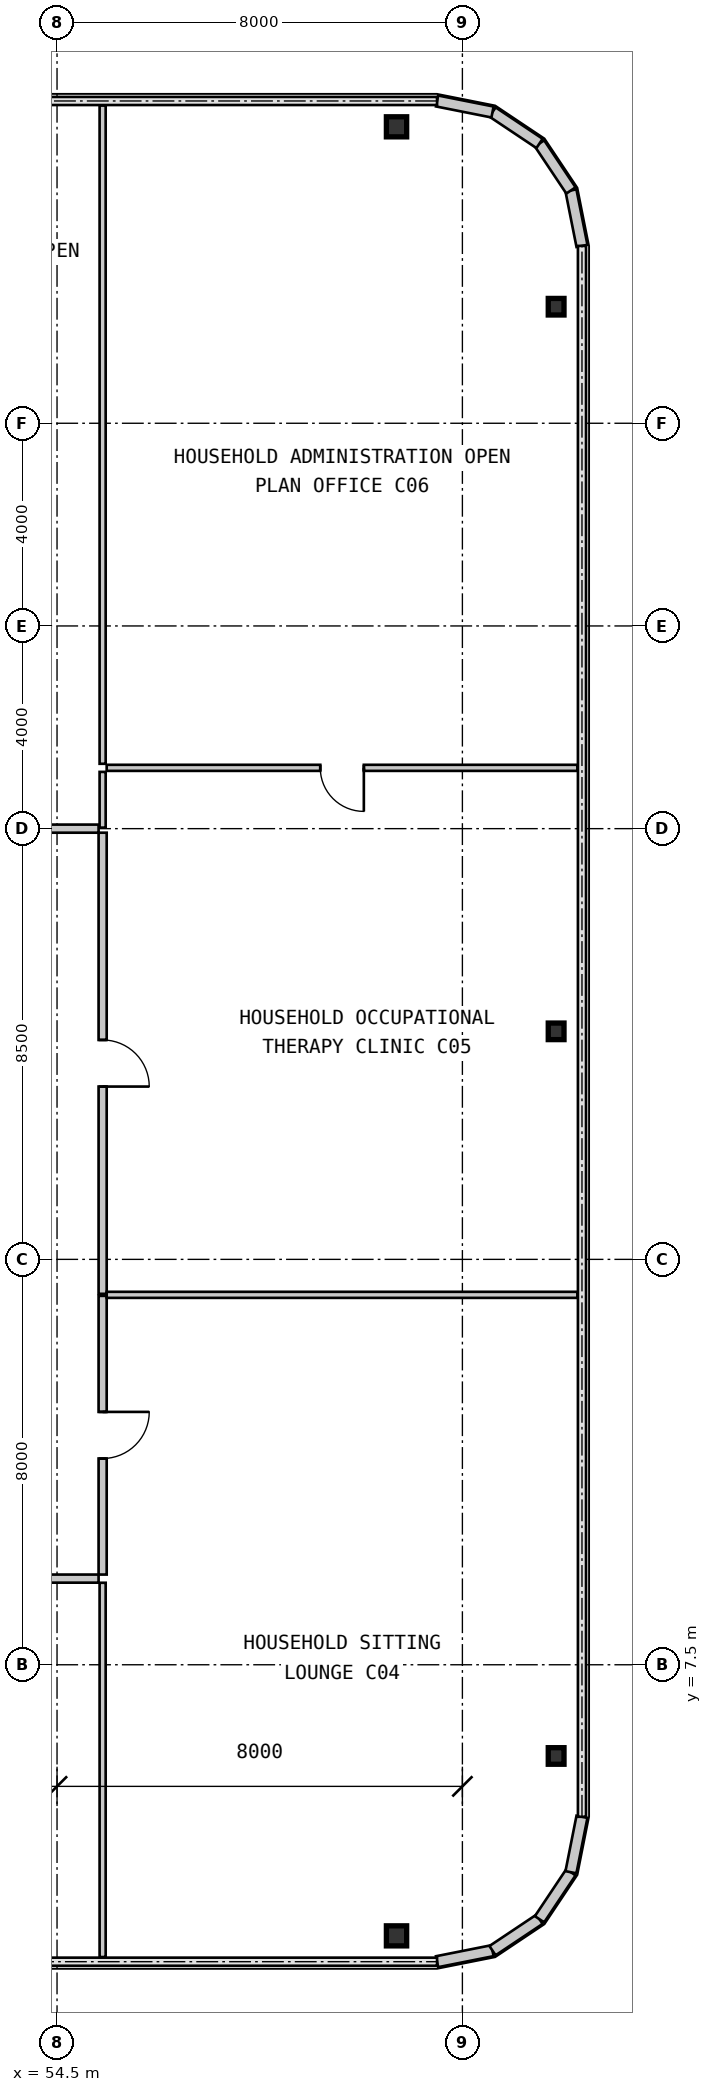
"""IFC4 building model, lengths in metres.
Left out: names, types, materials, properties, quantities, classifications, styles, units other than length and angle.
Written with IfcOpenShell. Run it as: python <this file> out.ifc"""

import sys

from ifc_helpers import new_model, si_unit, direction, frame, frame_2d, origin, origin_2d, place, context, subcontext, project, spatial, rectangle, i_section, extrude, source, transform, mapped, element, fill, save


model = new_model("IFC4")
c1 = context("Model", 3, precision=1e-05, world=origin(), true_north=direction((0.0, 1.0)))
c2 = subcontext(c1, "Body", "Model", "MODEL_VIEW")
j1 = project(units=[si_unit("LENGTHUNIT", "METRE"), si_unit("PLANEANGLEUNIT", "RADIAN")], contexts=[c1])
p1 = place(None, origin())
s1 = spatial("IfcSite", under=j1, at=p1, CompositionType="ELEMENT")
p2 = place(p1, origin())
s2 = spatial("IfcBuilding", under=s1, at=p2, CompositionType="ELEMENT")
p3 = place(p2, frame((0.0, 0.0, 38.85)))
s3 = spatial("IfcBuildingStorey", under=s2, at=p3, CompositionType="ELEMENT", Elevation=38.85)
m1 = source(origin(), c2, "Body", "SweptSolid", [
    extrude(i_section(OverallWidth=0.4, OverallDepth=0.396, WebThickness=0.022, FlangeThickness=0.034, at=origin_2d()), origin(), (0.0, 0.0, 1.0), 3.15),
])
for number, where, z_axis, x_axis in (
    (1, (61.2, 2.15, 0.0), (0.0, 0.0, 1.0), (1.0, 0.0, 0.0)),
    (2, (61.2, 37.85, 0.0), (0.0, 0.0, 1.0), (1.0, 0.0, 0.0)),
):
    element("IfcColumn", number, at=place(p3, frame(where, z_axis=z_axis, x_axis=x_axis)), inside=s3, PredefinedType="COLUMN", context=c2, shape_type="MappedRepresentation", body=[
        mapped(m1, transform((0.0, 0.0, 0.0), scale=1.0)),
    ])
m2 = source(origin(), c2, "Body", "SweptSolid", [
    extrude(i_section(OverallWidth=0.311, OverallDepth=0.327, WebThickness=0.016, FlangeThickness=0.025, at=origin_2d()), origin(), (0.0, 0.0, 1.0), 3.15),
])
for number, where, z_axis, x_axis in (
    (3, (64.35, 5.7, 0.0), (0.0, 0.0, 1.0), (1.0, 0.0, 0.0)),
    (4, (64.35, 20.0, 0.0), (0.0, 0.0, 1.0), (1.0, 0.0, 0.0)),
    (5, (64.35, 34.3, 0.0), (0.0, 0.0, 1.0), (1.0, 0.0, 0.0)),
):
    element("IfcColumn", number, at=place(p3, frame(where, z_axis=z_axis, x_axis=x_axis)), inside=s3, PredefinedType="COLUMN", context=c2, shape_type="MappedRepresentation", body=[
        mapped(m2, transform((0.0, 0.0, 0.0), scale=1.0)),
    ])
m3 = source(origin(), c2, "Body", "SweptSolid", [
    extrude(rectangle(XDim=1.116, YDim=0.22, at=frame_2d((0.558, 0.0))), origin(), (0.0, 0.0, 1.0), 2.93),
])
for number, where, z_axis, x_axis in (
    (6, (62.0, 1.64, 0.0), (0.0, 0.0, 1.0), (0.981, 0.195, 0.0)),
    (7, (63.094, 1.858, 0.0), (0.0, 0.0, 1.0), (0.831, 0.556, 0.0)),
    (8, (64.022, 2.478, 0.0), (0.0, 0.0, 1.0), (0.556, 0.831, 0.0)),
    (9, (64.642, 3.406, 0.0), (0.0, 0.0, 1.0), (0.195, 0.981, 0.0)),
    (10, (64.86, 35.5, 0.0), (0.0, 0.0, 1.0), (-0.195, 0.981, 0.0)),
    (11, (64.642, 36.594, 0.0), (0.0, 0.0, 1.0), (-0.556, 0.831, 0.0)),
    (12, (64.022, 37.522, 0.0), (0.0, 0.0, 1.0), (-0.831, 0.556, 0.0)),
    (13, (63.094, 38.142, 0.0), (0.0, 0.0, 1.0), (-0.981, 0.195, 0.0)),
):
    element("IfcWall", number, at=place(p3, frame(where, z_axis=z_axis, x_axis=x_axis)), inside=s3, PredefinedType="SOLIDWALL", context=c2, shape_type="MappedRepresentation", body=[
        mapped(m3, transform((0.0, 0.0, 0.0), scale=1.0)),
    ])
m4 = source(origin(), c2, "Body", "SweptSolid", [
    extrude(rectangle(XDim=2.04, YDim=0.16, at=frame_2d((1.02, 0.0))), origin(), (0.0, 0.0, 1.0), 2.93),
])
p4 = place(p3, frame((55.32, 9.2, 0.0), z_axis=(0.0, 0.0, 1.0), x_axis=(-1.0, 0.0, 0.0)))
e14 = element("IfcWall", 14, at=p4, inside=s3, PredefinedType="PARTITIONING", context=c2, shape_type="MappedRepresentation", body=[
    mapped(m4, transform((0.0, 0.0, 0.0), scale=1.0)),
])
m5 = source(origin(), c2, "Body", "SweptSolid", [
    extrude(rectangle(XDim=5.5, YDim=0.16, at=frame_2d((2.75, 0.0))), origin(), (0.0, 0.0, 1.0), 2.93),
])
p5 = place(p3, frame((55.4, 14.78, 0.0), z_axis=(0.0, 0.0, 1.0), x_axis=(0.0, -1.0, 0.0)))
e15 = element("IfcWall", 15, at=p5, inside=s3, PredefinedType="PARTITIONING", context=c2, shape_type="MappedRepresentation", body=[
    mapped(m5, transform((0.0, 0.0, 0.0), scale=1.0)),
])
m6 = source(origin(), c2, "Body", "SweptSolid", [
    extrude(rectangle(XDim=0.92, YDim=2.1, at=frame_2d((0.46, 1.05))), frame((0.0, 0.09, 0.0), z_axis=(0.0, -1.0, 0.0), x_axis=(1.0, 0.0, 0.0)), (0.0, 0.0, 1.0), 0.18),
])
p6 = place(p5, frame((2.29, 0.0, 0.0)))
e16 = element("IfcOpeningElement", 16, at=p6, cuts=e15, PredefinedType="OPENING", context=c2, shape_type="MappedRepresentation", body=[
    mapped(m6, transform((0.0, 0.0, 0.0), scale=1.0)),
])
m7 = source(origin(), c2, "Body", "SweptSolid", [
    extrude(rectangle(XDim=9.1, YDim=0.16, at=frame_2d((4.55, 0.0))), origin(), (0.0, 0.0, 1.0), 2.93),
])
p7 = place(p3, frame((55.4, 23.92, 0.0), z_axis=(0.0, 0.0, 1.0), x_axis=(0.0, -1.0, 0.0)))
e17 = element("IfcWall", 17, at=p7, inside=s3, PredefinedType="PARTITIONING", context=c2, shape_type="MappedRepresentation", body=[
    mapped(m7, transform((0.0, 0.0, 0.0), scale=1.0)),
])
p8 = place(p7, frame((4.09, 0.0, 0.0)))
e18 = element("IfcOpeningElement", 18, at=p8, cuts=e17, PredefinedType="OPENING", context=c2, shape_type="MappedRepresentation", body=[
    mapped(m6, transform((0.0, 0.0, 0.0), scale=1.0)),
])
m8 = source(origin(), c2, "Body", "SweptSolid", [
    extrude(rectangle(XDim=4.13, YDim=0.16, at=frame_2d((2.065, 0.0))), origin(), (0.0, 0.0, 1.0), 2.93),
])
p9 = place(p3, frame((51.19, 24.0, 0.0), z_axis=(0.0, 0.0, 1.0), x_axis=(1.0, 0.0, 0.0)))
e19 = element("IfcWall", 19, at=p9, inside=s3, PredefinedType="PARTITIONING", context=c2, shape_type="MappedRepresentation", body=[
    mapped(m8, transform((0.0, 0.0, 0.0), scale=1.0)),
])
m9 = source(origin(), c2, "Body", "SweptSolid", [
    extrude(rectangle(XDim=7.386, YDim=0.12, at=frame_2d((3.693, 0.0))), origin(), (0.0, 0.0, 1.0), 2.93),
])
p10 = place(p3, frame((55.4, 9.118, 0.0), z_axis=(0.0, 0.0, 1.0), x_axis=(0.0, -1.0, 0.0)))
e20 = element("IfcWall", 20, at=p10, inside=s3, PredefinedType="PARTITIONING", context=c2, shape_type="MappedRepresentation", body=[
    mapped(m9, transform((0.0, 0.0, 0.0), scale=1.0)),
])
m10 = source(origin(), c2, "Body", "SweptSolid", [
    extrude(rectangle(XDim=9.29, YDim=0.12, at=frame_2d((4.645, 0.0))), origin(), (0.0, 0.0, 1.0), 2.93),
])
p11 = place(p3, frame((55.48, 14.8, 0.0), z_axis=(0.0, 0.0, 1.0), x_axis=(1.0, 0.0, 0.0)))
e21 = element("IfcWall", 21, at=p11, inside=s3, PredefinedType="PARTITIONING", context=c2, shape_type="MappedRepresentation", body=[
    mapped(m10, transform((0.0, 0.0, 0.0), scale=1.0)),
])
p12 = place(p3, frame((55.48, 25.2, 0.0), z_axis=(0.0, 0.0, 1.0), x_axis=(1.0, 0.0, 0.0)))
e22 = element("IfcWall", 22, at=p12, inside=s3, PredefinedType="PARTITIONING", context=c2, shape_type="MappedRepresentation", body=[
    mapped(m10, transform((0.0, 0.0, 0.0), scale=1.0)),
])
m11 = source(origin(), c2, "Body", "SweptSolid", [
    extrude(rectangle(XDim=0.86, YDim=2.1, at=frame_2d((0.43, 1.05))), frame((0.0, 0.07, 0.0), z_axis=(0.0, -1.0, 0.0), x_axis=(1.0, 0.0, 0.0)), (0.0, 0.0, 1.0), 0.14),
])
p13 = place(p12, frame((4.215, 0.0, 0.0)))
e23 = element("IfcOpeningElement", 23, at=p13, cuts=e22, PredefinedType="OPENING", context=c2, shape_type="MappedRepresentation", body=[
    mapped(m11, transform((0.0, 0.0, 0.0), scale=1.0)),
])
m12 = source(origin(), c2, "Body", "SweptSolid", [
    extrude(rectangle(XDim=1.1, YDim=0.12, at=frame_2d((0.55, 0.0))), origin(), (0.0, 0.0, 1.0), 2.93),
])
p14 = place(p3, frame((55.4, 24.02, 0.0), z_axis=(0.0, 0.0, 1.0), x_axis=(0.0, 1.0, 0.0)))
e24 = element("IfcWall", 24, at=p14, inside=s3, PredefinedType="PARTITIONING", context=c2, shape_type="MappedRepresentation", body=[
    mapped(m12, transform((0.0, 0.0, 0.0), scale=1.0)),
])
m13 = source(origin(), c2, "Body", "SweptSolid", [
    extrude(rectangle(XDim=12.99, YDim=0.12, at=frame_2d((6.495, 0.0))), origin(), (0.0, 0.0, 1.0), 2.93),
])
p15 = place(p3, frame((55.4, 25.28, 0.0), z_axis=(0.0, 0.0, 1.0), x_axis=(0.0, 1.0, 0.0)))
e25 = element("IfcWall", 25, at=p15, inside=s3, PredefinedType="PARTITIONING", context=c2, shape_type="MappedRepresentation", body=[
    mapped(m13, transform((0.0, 0.0, 0.0), scale=1.0)),
])
m14 = source(origin(), c2, "Body", "SweptSolid", [
    extrude(rectangle(XDim=0.92, YDim=2.1, at=frame_2d((0.46, 1.05))), frame((0.0, 0.025, 0.0), z_axis=(0.0, -1.0, 0.0), x_axis=(1.0, 0.0, 0.0)), (0.0, 0.0, 1.0), 0.05),
])
p16 = place(p6, origin())
e26 = element("IfcDoor", 26, at=p16, inside=s3, OperationType="SINGLE_SWING_LEFT", PredefinedType="DOOR", context=c2, shape_type="MappedRepresentation", body=[
    mapped(m14, transform((0.0, 0.0, 0.0), scale=1.0)),
])
fill(e16, e26)
p17 = place(p8, origin())
e27 = element("IfcDoor", 27, at=p17, inside=s3, OperationType="SINGLE_SWING_RIGHT", PredefinedType="DOOR", context=c2, shape_type="MappedRepresentation", body=[
    mapped(m14, transform((0.0, 0.0, 0.0), scale=1.0)),
])
fill(e18, e27)
m15 = source(origin(), c2, "Body", "SweptSolid", [
    extrude(rectangle(XDim=0.86, YDim=2.1, at=frame_2d((0.43, 1.05))), frame((0.0, 0.025, 0.0), z_axis=(0.0, -1.0, 0.0), x_axis=(1.0, 0.0, 0.0)), (0.0, 0.0, 1.0), 0.05),
])
p18 = place(p13, frame((0.86, 0.0, 0.0), z_axis=(0.0, 0.0, 1.0), x_axis=(-1.0, 0.0, 0.0)))
e28 = element("IfcDoor", 28, at=p18, inside=s3, OperationType="SINGLE_SWING_LEFT", PredefinedType="DOOR", context=c2, shape_type="MappedRepresentation", body=[
    mapped(m15, transform((0.0, 0.0, 0.0), scale=1.0)),
])
fill(e23, e28)
save(model, sys.argv[1])
